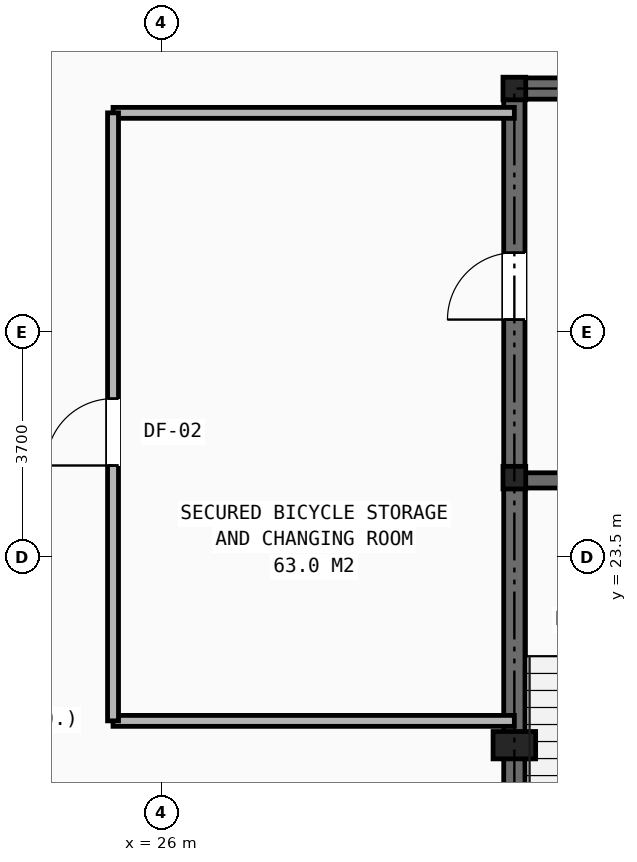
"""IFC4 building model, lengths in metres.
Left out: names, types, materials, properties, quantities, classifications, styles, units other than length and angle.
Written with IfcOpenShell. Run it as: python <this file> out.ifc"""

import sys

from ifc_helpers import new_model, si_unit, direction, frame, frame_2d, origin, origin_2d, place, context, subcontext, project, spatial, rectangle, i_section, extrude, element, fill, save


model = new_model("IFC4")
c1 = context("Model", 3, precision=1e-05, world=origin(), true_north=direction((0.0, 1.0)))
c2 = subcontext(c1, "Body", "Model", "MODEL_VIEW")
j1 = project(units=[si_unit("LENGTHUNIT", "METRE"), si_unit("PLANEANGLEUNIT", "RADIAN")], contexts=[c1])
p1 = place(None, origin())
s1 = spatial("IfcSite", under=j1, at=p1, CompositionType="ELEMENT")
p2 = place(p1, origin())
s2 = spatial("IfcBuilding", under=s1, at=p2, CompositionType="ELEMENT")
p3 = place(p2, frame((0.0, 0.0, -5.0)))
s3 = spatial("IfcBuildingStorey", under=s2, at=p3, CompositionType="ELEMENT", Elevation=-5.0)
for number, where, z_axis, x_axis in (
    (1, (31.8, 24.8, 0.0), (0.0, 0.0, 1.0), (1.0, 0.0, 0.0)),
    (2, (31.8, 31.2, 0.0), (0.0, 0.0, 1.0), (1.0, 0.0, 0.0)),
):
    element("IfcColumn", number, at=place(p3, frame(where, z_axis=z_axis, x_axis=x_axis)), inside=s3, PredefinedType="COLUMN", context=c2, shape_type="SweptSolid", body=[
        extrude(i_section(OverallWidth=0.374, OverallDepth=0.372, WebThickness=0.016, FlangeThickness=0.026, at=origin_2d()), origin(), (0.0, 0.0, 1.0), 5.0),
    ])
p4 = place(p3, frame((31.8, 20.4, 0.0), z_axis=(0.0, 0.0, 1.0), x_axis=(1.0, 0.0, 0.0)))
e3 = element("IfcColumn", 3, at=p4, inside=s3, PredefinedType="PILASTER", context=c2, shape_type="SweptSolid", body=[
    extrude(rectangle(XDim=0.7, YDim=0.45, at=origin_2d()), origin(), (0.0, 0.0, 1.0), 5.0),
])
p5 = place(p3, frame((31.8, 31.2, 0.0), z_axis=(0.0, 0.0, 1.0), x_axis=(1.0, 0.0, 0.0)))
e4 = element("IfcWall", 4, at=p5, inside=s3, PredefinedType="SHEAR", context=c2, shape_type="SweptSolid", body=[
    extrude(rectangle(XDim=16.4, YDim=0.35, at=frame_2d((8.2, 0.0))), origin(), (0.0, 0.0, 1.0), 4.65),
])
p6 = place(p3, frame((31.8, 16.4, 0.0), z_axis=(0.0, 0.0, 1.0), x_axis=(0.0, 1.0, 0.0)))
e5 = element("IfcWall", 5, at=p6, inside=s3, PredefinedType="SHEAR", context=c2, shape_type="SweptSolid", body=[
    extrude(rectangle(XDim=14.8, YDim=0.35, at=frame_2d((7.4, 0.0))), origin(), (0.0, 0.0, 1.0), 4.65),
])
p7 = place(p6, frame((11.0, 0.0, 0.0)))
e6 = element("IfcOpeningElement", 6, at=p7, cuts=e5, PredefinedType="OPENING", context=c2, shape_type="SweptSolid", body=[
    extrude(rectangle(XDim=1.1, YDim=2.15, at=frame_2d((0.55, 1.075))), frame((0.0, 0.185, 0.0), z_axis=(0.0, -1.0, 0.0), x_axis=(1.0, 0.0, 0.0)), (0.0, 0.0, 1.0), 0.37),
])
p8 = place(p3, frame((31.8, 24.755, 0.0), z_axis=(0.0, 0.0, 1.0), x_axis=(1.0, 0.0, 0.0)))
e7 = element("IfcWall", 7, at=p8, inside=s3, PredefinedType="SHEAR", context=c2, shape_type="SweptSolid", body=[
    extrude(rectangle(XDim=3.245, YDim=0.25, at=frame_2d((1.623, 0.0))), origin(), (0.0, 0.0, 1.0), 4.65),
])
p9 = place(p3, frame((25.2, 20.8, 0.0), z_axis=(0.0, 0.0, 1.0), x_axis=(1.0, 0.0, 0.0)))
e8 = element("IfcWall", 8, at=p9, inside=s3, PredefinedType="PARTITIONING", context=c2, shape_type="SweptSolid", body=[
    extrude(rectangle(XDim=6.6, YDim=0.18, at=frame_2d((3.3, 0.0))), origin(), (0.0, 0.0, 1.0), 4.65),
])
p10 = place(p3, frame((25.2, 30.8, 0.0), z_axis=(0.0, 0.0, 1.0), x_axis=(1.0, 0.0, 0.0)))
e9 = element("IfcWall", 9, at=p10, inside=s3, PredefinedType="PARTITIONING", context=c2, shape_type="SweptSolid", body=[
    extrude(rectangle(XDim=6.6, YDim=0.18, at=frame_2d((3.3, 0.0))), origin(), (0.0, 0.0, 1.0), 3.79),
])
p11 = place(p3, frame((25.2, 20.8, 0.0), z_axis=(0.0, 0.0, 1.0), x_axis=(0.0, 1.0, 0.0)))
e10 = element("IfcWall", 10, at=p11, inside=s3, PredefinedType="PARTITIONING", context=c2, shape_type="SweptSolid", body=[
    extrude(rectangle(XDim=10.0, YDim=0.18, at=frame_2d((5.0, 0.0))), origin(), (0.0, 0.0, 1.0), 4.65),
])
p12 = place(p11, frame((4.2, 0.0, 0.0)))
e11 = element("IfcOpeningElement", 11, at=p12, cuts=e10, PredefinedType="OPENING", context=c2, shape_type="SweptSolid", body=[
    extrude(rectangle(XDim=1.1, YDim=2.15, at=frame_2d((0.55, 1.075))), frame((0.0, 0.1, 0.0), z_axis=(0.0, -1.0, 0.0), x_axis=(1.0, 0.0, 0.0)), (0.0, 0.0, 1.0), 0.2),
])
p13 = place(p7, origin())
e12 = element("IfcDoor", 12, at=p13, inside=s3, OperationType="SINGLE_SWING_LEFT", PredefinedType="DOOR", context=c2, shape_type="SweptSolid", body=[
    extrude(rectangle(XDim=1.1, YDim=2.15, at=frame_2d((0.55, 1.075))), frame((0.0, 0.025, 0.0), z_axis=(0.0, -1.0, 0.0), x_axis=(1.0, 0.0, 0.0)), (0.0, 0.0, 1.0), 0.05),
])
fill(e6, e12)
p14 = place(p12, origin())
e13 = element("IfcDoor", 13, at=p14, inside=s3, OperationType="SINGLE_SWING_LEFT", PredefinedType="DOOR", context=c2, shape_type="SweptSolid", body=[
    extrude(rectangle(XDim=1.1, YDim=2.15, at=frame_2d((0.55, 1.075))), frame((0.0, 0.025, 0.0), z_axis=(0.0, -1.0, 0.0), x_axis=(1.0, 0.0, 0.0)), (0.0, 0.0, 1.0), 0.05),
])
fill(e11, e13)
save(model, sys.argv[1])
